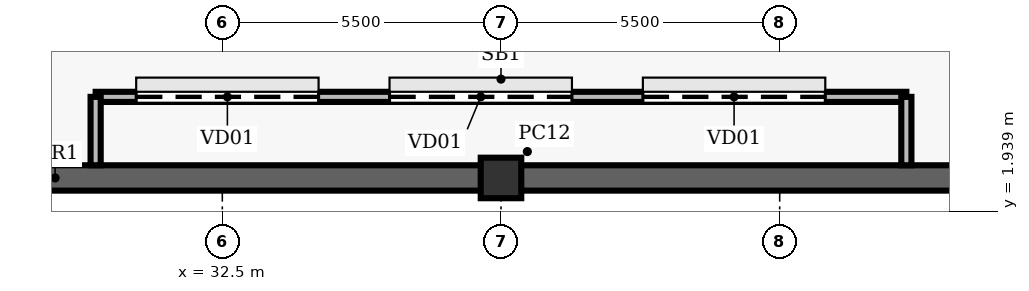
"""IFC4 building model, lengths in metres.
Left out: names, types, materials, properties, quantities, classifications, styles, units other than length and angle.
Written with IfcOpenShell. Run it as: python <this file> out.ifc"""

import sys

from ifc_helpers import new_model, si_unit, direction, frame, frame_2d, origin, origin_2d, place, context, subcontext, project, spatial, rectangle, extrude, element, fill, save


model = new_model("IFC4")
c1 = context("Model", 3, precision=1e-05, world=origin(), true_north=direction((0.0, 1.0)))
c2 = subcontext(c1, "Body", "Model", "MODEL_VIEW")
j1 = project(units=[si_unit("LENGTHUNIT", "METRE"), si_unit("PLANEANGLEUNIT", "RADIAN")], contexts=[c1])
p1 = place(None, origin())
s1 = spatial("IfcSite", under=j1, at=p1, CompositionType="ELEMENT")
p2 = place(p1, origin())
s2 = spatial("IfcBuilding", under=s1, at=p2, CompositionType="ELEMENT")
p3 = place(p2, frame((0.0, 0.0, -6.0)))
s3 = spatial("IfcBuildingStorey", under=s2, at=p3, CompositionType="ELEMENT", Elevation=-6.0)
for number, where, z_axis, x_axis in (
    (1, (0.25, 2.6, -0.45), (0.0, 0.0, 1.0), (1.0, 0.0, 0.0)),
    (2, (38.0, 2.6, -0.45), (0.0, 0.0, 1.0), (1.0, 0.0, 0.0)),
):
    element("IfcWall", number, at=place(p3, frame(where, z_axis=z_axis, x_axis=x_axis)), inside=s3, PredefinedType="USERDEFINED", context=c2, shape_type="SweptSolid", body=[
        extrude(rectangle(XDim=37.75, YDim=0.5, at=frame_2d((18.875, 0.0))), origin(), (0.0, 0.0, 1.0), 6.1),
    ])
p4 = place(p3, frame((38.0, 2.6, -0.45), z_axis=(0.0, 0.0, 1.0), x_axis=(1.0, 0.0, 0.0)))
e3 = element("IfcColumn", 3, at=p4, inside=s3, PredefinedType="COLUMN", context=c2, shape_type="SweptSolid", body=[
    extrude(rectangle(XDim=0.8, YDim=0.8, at=origin_2d()), origin(), (0.0, 0.0, 1.0), 6.45),
])
p5 = place(p3, frame((30.0, 4.2, 0.0), z_axis=(0.0, 0.0, 1.0), x_axis=(1.0, 0.0, 0.0)))
e4 = element("IfcWall", 4, at=p5, inside=s3, PredefinedType="PARTITIONING", context=c2, shape_type="SweptSolid", body=[
    extrude(rectangle(XDim=16.0, YDim=0.2, at=frame_2d((8.0, 0.0))), origin(), (0.0, 0.0, 1.0), 4.71),
])
p6 = place(p5, frame((0.8, 0.0, 0.0)))
e5 = element("IfcOpeningElement", 5, at=p6, cuts=e4, PredefinedType="OPENING", context=c2, shape_type="SweptSolid", body=[
    extrude(rectangle(XDim=3.6, YDim=3.8, at=frame_2d((1.8, 1.9))), frame((0.0, 0.11, 0.0), z_axis=(0.0, -1.0, 0.0), x_axis=(1.0, 0.0, 0.0)), (0.0, 0.0, 1.0), 0.22),
])
p7 = place(p5, frame((5.8, 0.0, 0.0)))
e6 = element("IfcOpeningElement", 6, at=p7, cuts=e4, PredefinedType="OPENING", context=c2, shape_type="SweptSolid", body=[
    extrude(rectangle(XDim=3.6, YDim=3.8, at=frame_2d((1.8, 1.9))), frame((0.0, 0.11, 0.0), z_axis=(0.0, -1.0, 0.0), x_axis=(1.0, 0.0, 0.0)), (0.0, 0.0, 1.0), 0.22),
])
p8 = place(p5, frame((10.8, 0.0, 0.0)))
e7 = element("IfcOpeningElement", 7, at=p8, cuts=e4, PredefinedType="OPENING", context=c2, shape_type="SweptSolid", body=[
    extrude(rectangle(XDim=3.6, YDim=3.8, at=frame_2d((1.8, 1.9))), frame((0.0, 0.11, 0.0), z_axis=(0.0, -1.0, 0.0), x_axis=(1.0, 0.0, 0.0)), (0.0, 0.0, 1.0), 0.22),
])
for number, where, z_axis, x_axis in (
    (8, (30.0, 2.85, 0.0), (0.0, 0.0, 1.0), (0.0, 1.0, 0.0)),
    (9, (46.0, 2.85, 0.0), (0.0, 0.0, 1.0), (0.0, 1.0, 0.0)),
):
    element("IfcWall", number, at=place(p3, frame(where, z_axis=z_axis, x_axis=x_axis)), inside=s3, PredefinedType="PARTITIONING", context=c2, shape_type="SweptSolid", body=[
        extrude(rectangle(XDim=1.35, YDim=0.2, at=frame_2d((0.675, 0.0))), origin(), (0.0, 0.0, 1.0), 4.71),
    ])
p9 = place(p6, origin())
e10 = element("IfcDoor", 10, at=p9, inside=s3, OperationType="ROLLINGUP", PredefinedType="TRAPDOOR", context=c2, shape_type="SweptSolid", body=[
    extrude(rectangle(XDim=3.6, YDim=3.8, at=frame_2d((1.8, 1.9))), frame((0.0, 0.025, 0.0), z_axis=(0.0, -1.0, 0.0), x_axis=(1.0, 0.0, 0.0)), (0.0, 0.0, 1.0), 0.05),
])
fill(e5, e10)
p10 = place(p7, origin())
e11 = element("IfcDoor", 11, at=p10, inside=s3, OperationType="ROLLINGUP", PredefinedType="TRAPDOOR", context=c2, shape_type="SweptSolid", body=[
    extrude(rectangle(XDim=3.6, YDim=3.8, at=frame_2d((1.8, 1.9))), frame((0.0, 0.025, 0.0), z_axis=(0.0, -1.0, 0.0), x_axis=(1.0, 0.0, 0.0)), (0.0, 0.0, 1.0), 0.05),
])
fill(e6, e11)
p11 = place(p8, origin())
e12 = element("IfcDoor", 12, at=p11, inside=s3, OperationType="ROLLINGUP", PredefinedType="TRAPDOOR", context=c2, shape_type="SweptSolid", body=[
    extrude(rectangle(XDim=3.6, YDim=3.8, at=frame_2d((1.8, 1.9))), frame((0.0, 0.025, 0.0), z_axis=(0.0, -1.0, 0.0), x_axis=(1.0, 0.0, 0.0)), (0.0, 0.0, 1.0), 0.05),
])
fill(e7, e12)
save(model, sys.argv[1])
